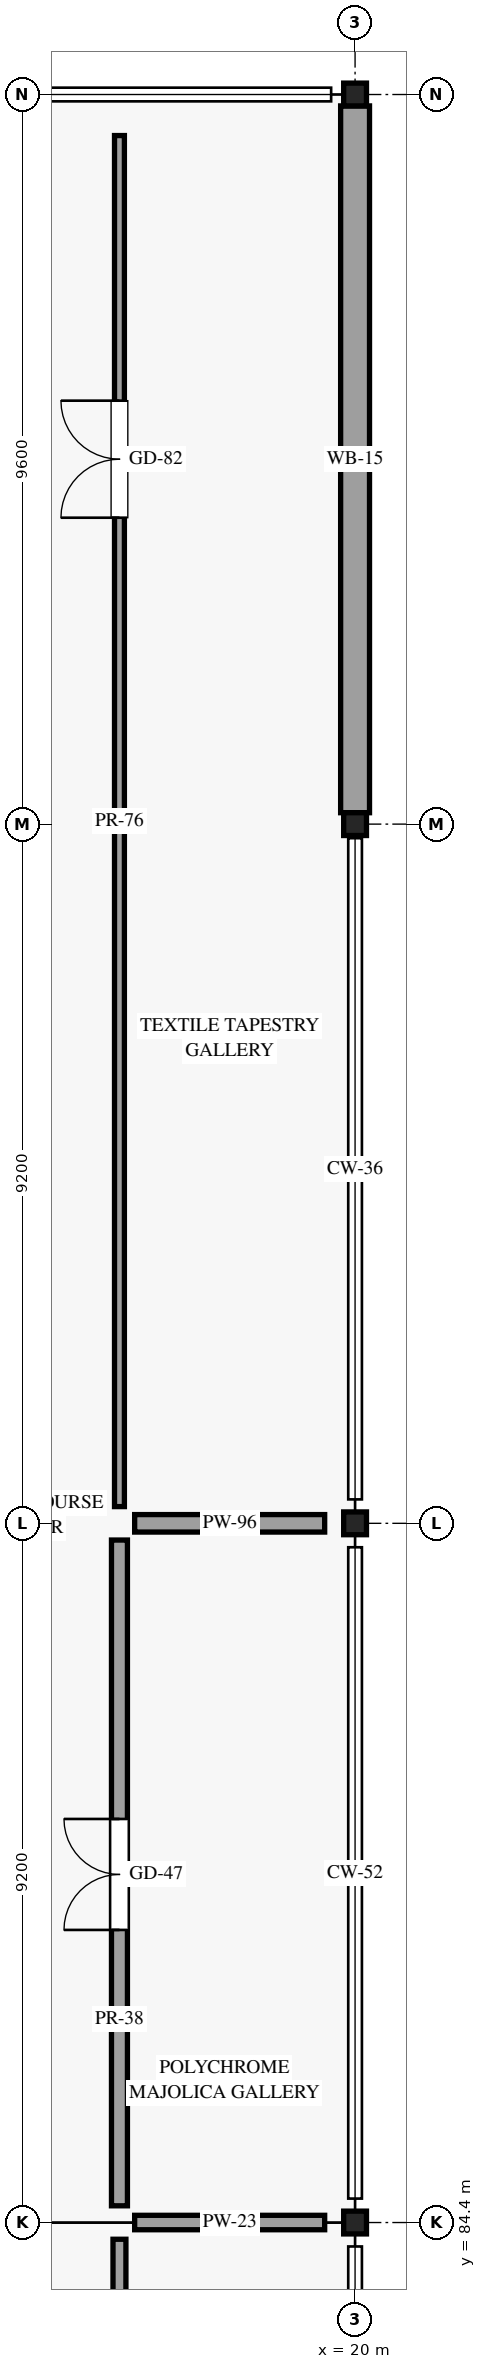
"""IFC4 building model, lengths in metres.
Left out: names, types, materials, properties, quantities, classifications, styles, units other than length and angle.
Written with IfcOpenShell. Run it as: python <this file> out.ifc"""

import sys

from ifc_helpers import new_model, si_unit, direction, frame, frame_2d, origin, origin_2d, place, context, subcontext, project, spatial, rectangle, i_section, extrude, element, fill, save


model = new_model("IFC4")
c1 = context("Model", 3, precision=1e-05, world=origin(), true_north=direction((0.0, 1.0)))
c2 = subcontext(c1, "Body", "Model", "MODEL_VIEW")
j1 = project(units=[si_unit("LENGTHUNIT", "METRE"), si_unit("PLANEANGLEUNIT", "RADIAN")], contexts=[c1])
p1 = place(None, origin())
s1 = spatial("IfcSite", under=j1, at=p1, CompositionType="ELEMENT")
p2 = place(p1, origin())
s2 = spatial("IfcBuilding", under=s1, at=p2, CompositionType="ELEMENT")
p3 = place(p2, frame((0.0, 0.0, 5.4)))
s3 = spatial("IfcBuildingStorey", under=s2, at=p3, CompositionType="ELEMENT", Elevation=5.4)
for number, where, z_axis, x_axis in (
    (1, (20.0, 84.4, 0.0), (0.0, 0.0, 1.0), (1.0, 0.0, 0.0)),
    (2, (20.0, 93.6, 0.0), (0.0, 0.0, 1.0), (1.0, 0.0, 0.0)),
    (3, (20.0, 102.8, 0.0), (0.0, 0.0, 1.0), (1.0, 0.0, 0.0)),
    (4, (20.0, 112.4, 0.0), (0.0, 0.0, 1.0), (1.0, 0.0, 0.0)),
):
    element("IfcColumn", number, at=place(p3, frame(where, z_axis=z_axis, x_axis=x_axis)), inside=s3, PredefinedType="COLUMN", context=c2, shape_type="SweptSolid", body=[
        extrude(i_section(OverallWidth=0.3, OverallDepth=0.3, WebThickness=0.011, FlangeThickness=0.019, FilletRadius=0.027, at=origin_2d()), origin(), (0.0, 0.0, 1.0), 4.8),
    ])
p4 = place(p3, frame((20.0, 102.95, 0.0), z_axis=(0.0, 0.0, 1.0), x_axis=(0.0, 1.0, 0.0)))
e5 = element("IfcWall", 5, at=p4, inside=s3, PredefinedType="STANDARD", context=c2, shape_type="SweptSolid", body=[
    extrude(rectangle(XDim=9.3, YDim=0.38, at=frame_2d((4.65, 0.0))), origin(), (0.0, 0.0, 1.0), 4.095),
])
p5 = place(p3, frame((16.9, 66.22, 0.0), z_axis=(0.0, 0.0, 1.0), x_axis=(0.0, 1.0, 0.0)))
e6 = element("IfcWall", 6, at=p5, inside=s3, PredefinedType="PARTITIONING", context=c2, shape_type="SweptSolid", body=[
    extrude(rectangle(XDim=17.96, YDim=0.17, at=frame_2d((8.98, 0.0))), origin(), (0.0, 0.0, 1.0), 4.095),
])
p6 = place(p5, frame((3.713, 0.0, 0.0)))
e7 = element("IfcOpeningElement", 7, at=p6, cuts=e6, PredefinedType="OPENING", context=c2, shape_type="SweptSolid", body=[
    extrude(rectangle(XDim=1.82, YDim=2.46, at=frame_2d((0.91, 1.23))), frame((0.0, 0.095, 0.0), z_axis=(0.0, -1.0, 0.0), x_axis=(1.0, 0.0, 0.0)), (0.0, 0.0, 1.0), 0.19),
])
p7 = place(p3, frame((17.1, 84.4, 0.0), z_axis=(0.0, 0.0, 1.0), x_axis=(1.0, 0.0, 0.0)))
e8 = element("IfcWall", 8, at=p7, inside=s3, PredefinedType="PARTITIONING", context=c2, shape_type="SweptSolid", body=[
    extrude(rectangle(XDim=2.5, YDim=0.19, at=frame_2d((1.25, 0.0))), origin(), (0.0, 0.0, 1.0), 4.095),
])
p8 = place(p3, frame((16.9, 84.62, 0.0), z_axis=(0.0, 0.0, 1.0), x_axis=(0.0, 1.0, 0.0)))
e9 = element("IfcWall", 9, at=p8, inside=s3, PredefinedType="PARTITIONING", context=c2, shape_type="SweptSolid", body=[
    extrude(rectangle(XDim=8.76, YDim=0.21, at=frame_2d((4.38, 0.0))), origin(), (0.0, 0.0, 1.0), 4.095),
])
p9 = place(p8, frame((3.63, 0.0, 0.0)))
e10 = element("IfcOpeningElement", 10, at=p9, cuts=e9, PredefinedType="OPENING", context=c2, shape_type="SweptSolid", body=[
    extrude(rectangle(XDim=1.46, YDim=2.32, at=frame_2d((0.73, 1.16))), frame((0.0, 0.115, 0.0), z_axis=(0.0, -1.0, 0.0), x_axis=(1.0, 0.0, 0.0)), (0.0, 0.0, 1.0), 0.23),
])
p10 = place(p3, frame((17.1, 93.6, 0.0), z_axis=(0.0, 0.0, 1.0), x_axis=(1.0, 0.0, 0.0)))
e11 = element("IfcWall", 11, at=p10, inside=s3, PredefinedType="PARTITIONING", context=c2, shape_type="SweptSolid", body=[
    extrude(rectangle(XDim=2.5, YDim=0.23, at=frame_2d((1.25, 0.0))), origin(), (0.0, 0.0, 1.0), 4.095),
])
p11 = place(p3, frame((16.9, 93.82, 0.0), z_axis=(0.0, 0.0, 1.0), x_axis=(0.0, 1.0, 0.0)))
e12 = element("IfcWall", 12, at=p11, inside=s3, PredefinedType="PARTITIONING", context=c2, shape_type="SweptSolid", body=[
    extrude(rectangle(XDim=18.04, YDim=0.13, at=frame_2d((9.02, 0.0))), origin(), (0.0, 0.0, 1.0), 4.095),
])
p12 = place(p11, frame((13.012, 0.0, 0.0)))
e13 = element("IfcOpeningElement", 13, at=p12, cuts=e12, PredefinedType="OPENING", context=c2, shape_type="SweptSolid", body=[
    extrude(rectangle(XDim=1.54, YDim=2.36, at=frame_2d((0.77, 1.18))), frame((0.0, 0.075, 0.0), z_axis=(0.0, -1.0, 0.0), x_axis=(1.0, 0.0, 0.0)), (0.0, 0.0, 1.0), 0.15),
])
p13 = place(p9, origin())
e14 = element("IfcDoor", 14, at=p13, inside=s3, OperationType="DOUBLE_DOOR_SINGLE_SWING", PredefinedType="DOOR", context=c2, shape_type="SweptSolid", body=[
    extrude(rectangle(XDim=1.46, YDim=2.32, at=frame_2d((0.73, 1.16))), frame((0.0, 0.025, 0.0), z_axis=(0.0, -1.0, 0.0), x_axis=(1.0, 0.0, 0.0)), (0.0, 0.0, 1.0), 0.05),
])
fill(e10, e14)
p14 = place(p12, origin())
e15 = element("IfcDoor", 15, at=p14, inside=s3, OperationType="DOUBLE_DOOR_SINGLE_SWING", PredefinedType="DOOR", context=c2, shape_type="SweptSolid", body=[
    extrude(rectangle(XDim=1.54, YDim=2.36, at=frame_2d((0.77, 1.18))), frame((0.0, 0.025, 0.0), z_axis=(0.0, -1.0, 0.0), x_axis=(1.0, 0.0, 0.0)), (0.0, 0.0, 1.0), 0.05),
])
fill(e13, e15)
save(model, sys.argv[1])
